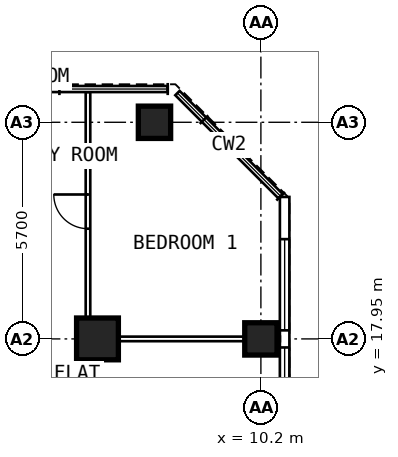
"""IFC4 building model, lengths in metres.
Left out: names, types, materials, properties, quantities, classifications, styles, units other than length and angle.
Written with IfcOpenShell. Run it as: python <this file> out.ifc"""

import sys

from ifc_helpers import new_model, si_unit, direction, frame, frame_2d, origin, origin_2d, place, context, subcontext, project, spatial, rectangle, extrude, element, fill, save


model = new_model("IFC4")
c1 = context("Model", 3, precision=1e-05, world=origin(), true_north=direction((0.0, 1.0)))
c2 = subcontext(c1, "Body", "Model", "MODEL_VIEW")
j1 = project(units=[si_unit("LENGTHUNIT", "METRE"), si_unit("PLANEANGLEUNIT", "RADIAN")], contexts=[c1])
p1 = place(None, origin())
s1 = spatial("IfcSite", under=j1, at=p1, CompositionType="ELEMENT")
p2 = place(p1, origin())
s2 = spatial("IfcBuilding", under=s1, at=p2, CompositionType="ELEMENT")
p3 = place(p2, frame((0.0, 0.0, 242.4)))
s3 = spatial("IfcBuildingStorey", under=s2, at=p3, CompositionType="ELEMENT", Elevation=242.4)
for number, where, z_axis, x_axis in (
    (1, (10.2, 17.95, 0.0), (0.0, 0.0, 1.0), (0.0, 1.0, 0.0)),
    (2, (7.4, 23.65, 0.0), (0.0, 0.0, 1.0), (0.0, 1.0, 0.0)),
):
    element("IfcColumn", number, at=place(p3, frame(where, z_axis=z_axis, x_axis=x_axis)), inside=s3, PredefinedType="COLUMN", context=c2, shape_type="SweptSolid", body=[
        extrude(rectangle(XDim=0.85, YDim=0.85, at=origin_2d()), origin(), (0.0, 0.0, 1.0), 3.6),
    ])
p4 = place(p3, frame((5.9, 17.95, 0.0), z_axis=(0.0, 0.0, 1.0), x_axis=(0.0, 1.0, 0.0)))
e3 = element("IfcColumn", 3, at=p4, inside=s3, PredefinedType="COLUMN", context=c2, shape_type="SweptSolid", body=[
    extrude(rectangle(XDim=1.1, YDim=1.1, at=origin_2d()), origin(), (0.0, 0.0, 1.0), 3.6),
])
p5 = place(p3, frame((10.825, 6.409, 0.0), z_axis=(0.0, 0.0, 1.0), x_axis=(0.0, 1.0, 0.0)))
e4 = element("IfcWall", 4, at=p5, inside=s3, PredefinedType="SOLIDWALL", context=c2, shape_type="SweptSolid", body=[
    extrude(rectangle(XDim=15.276, YDim=0.25, at=frame_2d((7.638, 0.0))), origin(), (0.0, 0.0, 1.0), 3.35),
])
p6 = place(p5, frame((0.366, 0.0, 0.8)))
e5 = element("IfcOpeningElement", 5, at=p6, cuts=e4, PredefinedType="OPENING", context=c2, shape_type="SweptSolid", body=[
    extrude(rectangle(XDim=2.4, YDim=1.8, at=frame_2d((1.2, 0.9))), frame((0.0, 0.137, 0.0), z_axis=(0.0, -1.0, 0.0), x_axis=(1.0, 0.0, 0.0)), (0.0, 0.0, 1.0), 0.274),
])
p7 = place(p5, frame((3.216, 0.0, 0.8)))
e6 = element("IfcOpeningElement", 6, at=p7, cuts=e4, PredefinedType="OPENING", context=c2, shape_type="SweptSolid", body=[
    extrude(rectangle(XDim=2.4, YDim=1.8, at=frame_2d((1.2, 0.9))), frame((0.0, 0.137, 0.0), z_axis=(0.0, -1.0, 0.0), x_axis=(1.0, 0.0, 0.0)), (0.0, 0.0, 1.0), 0.274),
])
p8 = place(p5, frame((6.066, 0.0, 0.8)))
e7 = element("IfcOpeningElement", 7, at=p8, cuts=e4, PredefinedType="OPENING", context=c2, shape_type="SweptSolid", body=[
    extrude(rectangle(XDim=2.4, YDim=1.8, at=frame_2d((1.2, 0.9))), frame((0.0, 0.137, 0.0), z_axis=(0.0, -1.0, 0.0), x_axis=(1.0, 0.0, 0.0)), (0.0, 0.0, 1.0), 0.274),
])
p9 = place(p5, frame((8.916, 0.0, 0.8)))
e8 = element("IfcOpeningElement", 8, at=p9, cuts=e4, PredefinedType="OPENING", context=c2, shape_type="SweptSolid", body=[
    extrude(rectangle(XDim=2.4, YDim=1.8, at=frame_2d((1.2, 0.9))), frame((0.0, 0.137, 0.0), z_axis=(0.0, -1.0, 0.0), x_axis=(1.0, 0.0, 0.0)), (0.0, 0.0, 1.0), 0.274),
])
p10 = place(p5, frame((11.766, 0.0, 0.8)))
e9 = element("IfcOpeningElement", 9, at=p10, cuts=e4, PredefinedType="OPENING", context=c2, shape_type="SweptSolid", body=[
    extrude(rectangle(XDim=2.4, YDim=1.8, at=frame_2d((1.2, 0.9))), frame((0.0, 0.137, 0.0), z_axis=(0.0, -1.0, 0.0), x_axis=(1.0, 0.0, 0.0)), (0.0, 0.0, 1.0), 0.274),
])
p11 = place(p3, frame((5.65, 9.6, 0.0), z_axis=(0.0, 0.0, 1.0), x_axis=(0.0, 1.0, 0.0)))
e10 = element("IfcWall", 10, at=p11, inside=s3, PredefinedType="PARTITIONING", context=c2, shape_type="SweptSolid", body=[
    extrude(rectangle(XDim=14.845, YDim=0.12, at=frame_2d((7.422, 0.0))), origin(), (0.0, 0.0, 1.0), 3.35),
])
p12 = place(p11, frame((5.05, 0.0, 0.0)))
e11 = element("IfcOpeningElement", 11, at=p12, cuts=e10, PredefinedType="OPENING", context=c2, shape_type="SweptSolid", body=[
    extrude(rectangle(XDim=0.9, YDim=2.1, at=frame_2d((0.45, 1.05))), frame((0.0, 0.072, 0.0), z_axis=(0.0, -1.0, 0.0), x_axis=(1.0, 0.0, 0.0)), (0.0, 0.0, 1.0), 0.144),
])
p13 = place(p11, frame((11.25, 0.0, 0.0)))
e12 = element("IfcOpeningElement", 12, at=p13, cuts=e10, PredefinedType="OPENING", context=c2, shape_type="SweptSolid", body=[
    extrude(rectangle(XDim=0.9, YDim=2.1, at=frame_2d((0.45, 1.05))), frame((0.0, 0.072, 0.0), z_axis=(0.0, -1.0, 0.0), x_axis=(1.0, 0.0, 0.0)), (0.0, 0.0, 1.0), 0.144),
])
p14 = place(p3, frame((5.71, 17.95, 0.0), z_axis=(0.0, 0.0, 1.0), x_axis=(1.0, 0.0, 0.0)))
e13 = element("IfcWall", 13, at=p14, inside=s3, PredefinedType="PARTITIONING", context=c2, shape_type="SweptSolid", body=[
    extrude(rectangle(XDim=4.99, YDim=0.12, at=frame_2d((2.495, 0.0))), origin(), (0.0, 0.0, 1.0), 2.45),
])
p15 = place(p9, origin())
e14 = element("IfcWindow", 14, at=p15, inside=s3, PartitioningType="SINGLE_PANEL", PredefinedType="WINDOW", context=c2, shape_type="SweptSolid", body=[
    extrude(rectangle(XDim=2.4, YDim=1.8, at=frame_2d((1.2, 0.9))), frame((0.0, 0.03, 0.0), z_axis=(0.0, -1.0, 0.0), x_axis=(1.0, 0.0, 0.0)), (0.0, 0.0, 1.0), 0.06),
])
fill(e8, e14)
p16 = place(p10, origin())
e15 = element("IfcWindow", 15, at=p16, inside=s3, PartitioningType="SINGLE_PANEL", PredefinedType="WINDOW", context=c2, shape_type="SweptSolid", body=[
    extrude(rectangle(XDim=2.4, YDim=1.8, at=frame_2d((1.2, 0.9))), frame((0.0, 0.03, 0.0), z_axis=(0.0, -1.0, 0.0), x_axis=(1.0, 0.0, 0.0)), (0.0, 0.0, 1.0), 0.06),
])
fill(e9, e15)
p17 = place(p13, origin())
e16 = element("IfcDoor", 16, at=p17, inside=s3, OperationType="SINGLE_SWING_RIGHT", PredefinedType="DOOR", context=c2, shape_type="SweptSolid", body=[
    extrude(rectangle(XDim=0.9, YDim=2.1, at=frame_2d((0.45, 1.05))), frame((0.0, 0.025, 0.0), z_axis=(0.0, -1.0, 0.0), x_axis=(1.0, 0.0, 0.0)), (0.0, 0.0, 1.0), 0.05),
])
fill(e12, e16)
save(model, sys.argv[1])
